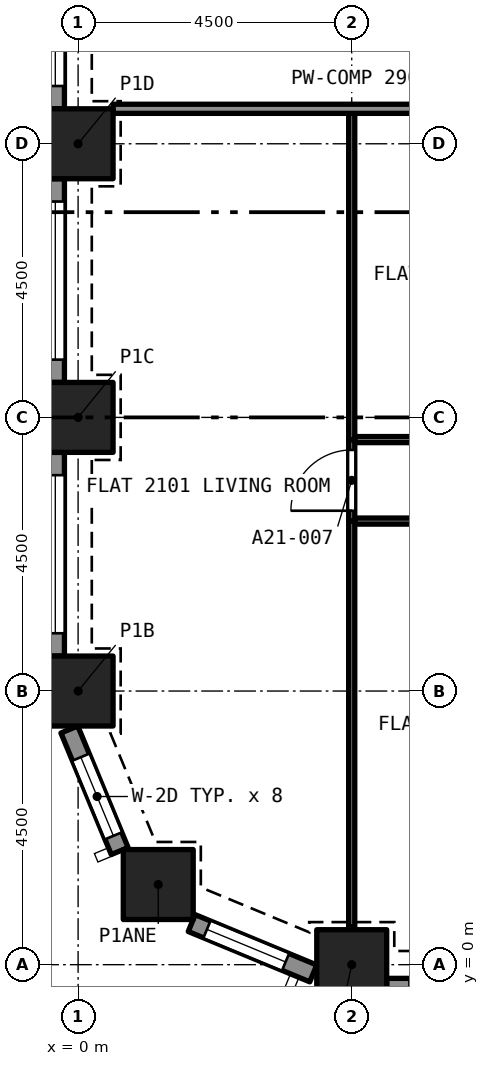
"""IFC4 building model, lengths in metres.
Left out: names, types, materials, properties, quantities, classifications, styles, units other than length and angle.
Written with IfcOpenShell. Run it as: python <this file> out.ifc"""

import sys

from ifc_helpers import new_model, si_unit, direction, frame, frame_2d, origin, origin_2d, place, context, subcontext, project, spatial, rectangle, extrude, element, fill, save


model = new_model("IFC4")
c1 = context("Model", 3, precision=1e-05, world=origin(), true_north=direction((0.0, 1.0)))
c2 = subcontext(c1, "Body", "Model", "MODEL_VIEW")
j1 = project(units=[si_unit("LENGTHUNIT", "METRE"), si_unit("PLANEANGLEUNIT", "RADIAN")], contexts=[c1])
p1 = place(None, origin())
s1 = spatial("IfcSite", under=j1, at=p1, CompositionType="ELEMENT")
p2 = place(p1, origin())
s2 = spatial("IfcBuilding", under=s1, at=p2, CompositionType="ELEMENT")
p3 = place(p2, frame((0.0, 0.0, 80.0)))
s3 = spatial("IfcBuildingStorey", under=s2, at=p3, CompositionType="ELEMENT", Elevation=80.0)
for number, where, z_axis, x_axis in (
    (1, (4.5, 0.0, 0.0), (0.0, 0.0, 1.0), (1.0, 0.0, 0.0)),
    (2, (1.318, 1.318, 0.0), (0.0, 0.0, 1.0), (1.0, 0.0, 0.0)),
    (3, (0.0, 4.5, 0.0), (0.0, 0.0, 1.0), (1.0, 0.0, 0.0)),
    (4, (0.0, 9.0, 0.0), (0.0, 0.0, 1.0), (1.0, 0.0, 0.0)),
    (5, (0.0, 13.5, 0.0), (0.0, 0.0, 1.0), (1.0, 0.0, 0.0)),
):
    element("IfcColumn", number, at=place(p3, frame(where, z_axis=z_axis, x_axis=x_axis)), inside=s3, PredefinedType="COLUMN", context=c2, shape_type="SweptSolid", body=[
        extrude(rectangle(XDim=1.15, YDim=1.15, at=origin_2d()), origin(), (0.0, 0.0, 1.0), 3.2),
    ])
p4 = place(p3, frame((0.684, 1.869, 0.0), z_axis=(0.0, 0.0, 1.0), x_axis=(-0.382723818695, 0.923862802911, 0.0)))
e6 = element("IfcWall", 6, at=p4, inside=s3, PredefinedType="SOLIDWALL", context=c2, shape_type="SweptSolid", body=[
    extrude(rectangle(XDim=2.164, YDim=0.3, at=frame_2d((1.082, 0.0))), origin(), (0.0, 0.0, 1.0), 3.2),
])
p5 = place(p4, frame((0.271, 0.0, 0.45)))
e7 = element("IfcOpeningElement", 7, at=p5, cuts=e6, PredefinedType="OPENING", context=c2, shape_type="SweptSolid", body=[
    extrude(rectangle(XDim=1.4, YDim=1.95, at=frame_2d((0.7, 0.975))), frame((0.0, 0.16, 0.0), z_axis=(0.0, -1.0, 0.0), x_axis=(1.0, 0.0, 0.0)), (0.0, 0.0, 1.0), 0.32),
])
p6 = place(p3, frame((3.868, -0.144, 0.0), z_axis=(0.0, 0.0, 1.0), x_axis=(-0.923862802911, 0.382723818695, 0.0)))
e8 = element("IfcWall", 8, at=p6, inside=s3, PredefinedType="SOLIDWALL", context=c2, shape_type="SweptSolid", body=[
    extrude(rectangle(XDim=2.164, YDim=0.3, at=frame_2d((1.082, 0.0))), origin(), (0.0, 0.0, 1.0), 3.2),
])
p7 = place(p6, frame((0.493, 0.0, 0.45)))
e9 = element("IfcOpeningElement", 9, at=p7, cuts=e8, PredefinedType="OPENING", context=c2, shape_type="SweptSolid", body=[
    extrude(rectangle(XDim=1.4, YDim=1.95, at=frame_2d((0.7, 0.975))), frame((0.0, 0.16, 0.0), z_axis=(0.0, -1.0, 0.0), x_axis=(1.0, 0.0, 0.0)), (0.0, 0.0, 1.0), 0.32),
])
p8 = place(p3, frame((8.425, -0.375, 0.0), z_axis=(0.0, 0.0, 1.0), x_axis=(-1.0, 0.0, 0.0)))
e10 = element("IfcWall", 10, at=p8, inside=s3, PredefinedType="SOLIDWALL", context=c2, shape_type="SweptSolid", body=[
    extrude(rectangle(XDim=3.35, YDim=0.3, at=frame_2d((1.675, 0.0))), origin(), (0.0, 0.0, 1.0), 3.2),
])
p9 = place(p8, frame((0.375, 0.0, 0.45)))
e11 = element("IfcOpeningElement", 11, at=p9, cuts=e10, PredefinedType="OPENING", context=c2, shape_type="SweptSolid", body=[
    extrude(rectangle(XDim=2.6, YDim=1.95, at=frame_2d((1.3, 0.975))), frame((0.0, 0.16, 0.0), z_axis=(0.0, -1.0, 0.0), x_axis=(1.0, 0.0, 0.0)), (0.0, 0.0, 1.0), 0.32),
])
p10 = place(p3, frame((-0.375, 14.075, 0.0), z_axis=(0.0, 0.0, 1.0), x_axis=(0.0, 1.0, 0.0)))
e12 = element("IfcWall", 12, at=p10, inside=s3, PredefinedType="SOLIDWALL", context=c2, shape_type="SweptSolid", body=[
    extrude(rectangle(XDim=3.35, YDim=0.3, at=frame_2d((1.675, 0.0))), origin(), (0.0, 0.0, 1.0), 3.2),
])
p11 = place(p10, frame((0.375, 0.0, 0.45)))
e13 = element("IfcOpeningElement", 13, at=p11, cuts=e12, PredefinedType="OPENING", context=c2, shape_type="SweptSolid", body=[
    extrude(rectangle(XDim=2.6, YDim=1.95, at=frame_2d((1.3, 0.975))), frame((0.0, 0.16, 0.0), z_axis=(0.0, -1.0, 0.0), x_axis=(1.0, 0.0, 0.0)), (0.0, 0.0, 1.0), 0.32),
])
p12 = place(p3, frame((-0.375, 9.575, 0.0), z_axis=(0.0, 0.0, 1.0), x_axis=(0.0, 1.0, 0.0)))
e14 = element("IfcWall", 14, at=p12, inside=s3, PredefinedType="SOLIDWALL", context=c2, shape_type="SweptSolid", body=[
    extrude(rectangle(XDim=3.35, YDim=0.3, at=frame_2d((1.675, 0.0))), origin(), (0.0, 0.0, 1.0), 3.2),
])
p13 = place(p12, frame((0.375, 0.0, 0.45)))
e15 = element("IfcOpeningElement", 15, at=p13, cuts=e14, PredefinedType="OPENING", context=c2, shape_type="SweptSolid", body=[
    extrude(rectangle(XDim=2.6, YDim=1.95, at=frame_2d((1.3, 0.975))), frame((0.0, 0.16, 0.0), z_axis=(0.0, -1.0, 0.0), x_axis=(1.0, 0.0, 0.0)), (0.0, 0.0, 1.0), 0.32),
])
p14 = place(p3, frame((-0.375, 5.075, 0.0), z_axis=(0.0, 0.0, 1.0), x_axis=(0.0, 1.0, 0.0)))
e16 = element("IfcWall", 16, at=p14, inside=s3, PredefinedType="SOLIDWALL", context=c2, shape_type="SweptSolid", body=[
    extrude(rectangle(XDim=3.35, YDim=0.3, at=frame_2d((1.675, 0.0))), origin(), (0.0, 0.0, 1.0), 3.2),
])
p15 = place(p14, frame((0.375, 0.0, 0.45)))
e17 = element("IfcOpeningElement", 17, at=p15, cuts=e16, PredefinedType="OPENING", context=c2, shape_type="SweptSolid", body=[
    extrude(rectangle(XDim=2.6, YDim=1.95, at=frame_2d((1.3, 0.975))), frame((0.0, 0.16, 0.0), z_axis=(0.0, -1.0, 0.0), x_axis=(1.0, 0.0, 0.0)), (0.0, 0.0, 1.0), 0.32),
])
p16 = place(p3, frame((9.0, 7.295, 0.0), z_axis=(0.0, 0.0, 1.0), x_axis=(-1.0, 0.0, 0.0)))
e18 = element("IfcWall", 18, at=p16, inside=s3, PredefinedType="PARTITIONING", context=c2, shape_type="SweptSolid", body=[
    extrude(rectangle(XDim=4.45, YDim=0.1, at=frame_2d((2.225, 0.0))), origin(), (0.0, 0.0, 1.0), 2.9),
])
p17 = place(p16, frame((1.8, 0.0, 0.0)))
e19 = element("IfcOpeningElement", 19, at=p17, cuts=e18, PredefinedType="OPENING", context=c2, shape_type="SweptSolid", body=[
    extrude(rectangle(XDim=0.9, YDim=2.1, at=frame_2d((0.45, 1.05))), frame((0.0, 0.06, 0.0), z_axis=(0.0, -1.0, 0.0), x_axis=(1.0, 0.0, 0.0)), (0.0, 0.0, 1.0), 0.12),
])
p18 = place(p3, frame((4.5, 0.622, 0.0), z_axis=(0.0, 0.0, 1.0), x_axis=(0.0, 1.0, 0.0)))
e20 = element("IfcWall", 20, at=p18, inside=s3, PredefinedType="PARTITIONING", context=c2, shape_type="SweptSolid", body=[
    extrude(rectangle(XDim=6.673, YDim=0.1, at=frame_2d((3.336, 0.0))), origin(), (0.0, 0.0, 1.0), 2.9),
])
p19 = place(p3, frame((4.55, 8.635, 0.0), z_axis=(0.0, 0.0, 1.0), x_axis=(1.0, 0.0, 0.0)))
e21 = element("IfcWall", 21, at=p19, inside=s3, PredefinedType="PARTITIONING", context=c2, shape_type="SweptSolid", body=[
    extrude(rectangle(XDim=3.913, YDim=0.1, at=frame_2d((1.957, 0.0))), origin(), (0.0, 0.0, 1.0), 2.9),
])
p20 = place(p19, frame((1.482, 0.0, 0.0)))
e22 = element("IfcOpeningElement", 22, at=p20, cuts=e21, PredefinedType="OPENING", context=c2, shape_type="SweptSolid", body=[
    extrude(rectangle(XDim=0.9, YDim=2.1, at=frame_2d((0.45, 1.05))), frame((0.0, 0.06, 0.0), z_axis=(0.0, -1.0, 0.0), x_axis=(1.0, 0.0, 0.0)), (0.0, 0.0, 1.0), 0.12),
])
p21 = place(p3, frame((4.5, 7.295, 0.0), z_axis=(0.0, 0.0, 1.0), x_axis=(0.0, 1.0, 0.0)))
e23 = element("IfcWall", 23, at=p21, inside=s3, PredefinedType="PARTITIONING", context=c2, shape_type="SweptSolid", body=[
    extrude(rectangle(XDim=1.34, YDim=0.1, at=frame_2d((0.67, 0.0))), origin(), (0.0, 0.0, 1.0), 2.9),
])
p22 = place(p21, frame((0.17, 0.0, 0.0)))
e24 = element("IfcOpeningElement", 24, at=p22, cuts=e23, PredefinedType="OPENING", context=c2, shape_type="SweptSolid", body=[
    extrude(rectangle(XDim=1.0, YDim=2.1, at=frame_2d((0.5, 1.05))), frame((0.0, 0.06, 0.0), z_axis=(0.0, -1.0, 0.0), x_axis=(1.0, 0.0, 0.0)), (0.0, 0.0, 1.0), 0.12),
])
p23 = place(p3, frame((4.5, 8.635, 0.0), z_axis=(0.0, 0.0, 1.0), x_axis=(0.0, 1.0, 0.0)))
e25 = element("IfcWall", 25, at=p23, inside=s3, PredefinedType="PARTITIONING", context=c2, shape_type="SweptSolid", body=[
    extrude(rectangle(XDim=5.365, YDim=0.1, at=frame_2d((2.683, 0.0))), origin(), (0.0, 0.0, 1.0), 2.9),
])
p24 = place(p3, frame((0.575, 14.075, 0.0), z_axis=(0.0, 0.0, 1.0), x_axis=(1.0, 0.0, 0.0)))
e26 = element("IfcWall", 26, at=p24, inside=s3, PredefinedType="PARTITIONING", context=c2, shape_type="SweptSolid", body=[
    extrude(rectangle(XDim=10.075, YDim=0.15, at=frame_2d((5.038, 0.0))), origin(), (0.0, 0.0, 1.0), 2.9),
])
p25 = place(p5, origin())
e27 = element("IfcWindow", 27, at=p25, inside=s3, PartitioningType="SINGLE_PANEL", PredefinedType="WINDOW", context=c2, shape_type="SweptSolid", body=[
    extrude(rectangle(XDim=1.4, YDim=1.95, at=frame_2d((0.7, 0.975))), frame((0.0, 0.03, 0.0), z_axis=(0.0, -1.0, 0.0), x_axis=(1.0, 0.0, 0.0)), (0.0, 0.0, 1.0), 0.06),
])
fill(e7, e27)
p26 = place(p7, origin())
e28 = element("IfcWindow", 28, at=p26, inside=s3, PartitioningType="SINGLE_PANEL", PredefinedType="WINDOW", context=c2, shape_type="SweptSolid", body=[
    extrude(rectangle(XDim=1.4, YDim=1.95, at=frame_2d((0.7, 0.975))), frame((0.0, 0.03, 0.0), z_axis=(0.0, -1.0, 0.0), x_axis=(1.0, 0.0, 0.0)), (0.0, 0.0, 1.0), 0.06),
])
fill(e9, e28)
p27 = place(p11, origin())
e29 = element("IfcWindow", 29, at=p27, inside=s3, PartitioningType="SINGLE_PANEL", PredefinedType="WINDOW", context=c2, shape_type="SweptSolid", body=[
    extrude(rectangle(XDim=2.6, YDim=1.95, at=frame_2d((1.3, 0.975))), frame((0.0, 0.03, 0.0), z_axis=(0.0, -1.0, 0.0), x_axis=(1.0, 0.0, 0.0)), (0.0, 0.0, 1.0), 0.06),
])
fill(e13, e29)
p28 = place(p13, origin())
e30 = element("IfcWindow", 30, at=p28, inside=s3, PartitioningType="SINGLE_PANEL", PredefinedType="WINDOW", context=c2, shape_type="SweptSolid", body=[
    extrude(rectangle(XDim=2.6, YDim=1.95, at=frame_2d((1.3, 0.975))), frame((0.0, 0.03, 0.0), z_axis=(0.0, -1.0, 0.0), x_axis=(1.0, 0.0, 0.0)), (0.0, 0.0, 1.0), 0.06),
])
fill(e15, e30)
p29 = place(p15, origin())
e31 = element("IfcWindow", 31, at=p29, inside=s3, PartitioningType="SINGLE_PANEL", PredefinedType="WINDOW", context=c2, shape_type="SweptSolid", body=[
    extrude(rectangle(XDim=2.6, YDim=1.95, at=frame_2d((1.3, 0.975))), frame((0.0, 0.03, 0.0), z_axis=(0.0, -1.0, 0.0), x_axis=(1.0, 0.0, 0.0)), (0.0, 0.0, 1.0), 0.06),
])
fill(e17, e31)
p30 = place(p22, origin())
e32 = element("IfcDoor", 32, at=p30, inside=s3, OperationType="SINGLE_SWING_RIGHT", PredefinedType="DOOR", context=c2, shape_type="SweptSolid", body=[
    extrude(rectangle(XDim=1.0, YDim=2.1, at=frame_2d((0.5, 1.05))), frame((0.0, 0.025, 0.0), z_axis=(0.0, -1.0, 0.0), x_axis=(1.0, 0.0, 0.0)), (0.0, 0.0, 1.0), 0.05),
])
fill(e24, e32)
save(model, sys.argv[1])
